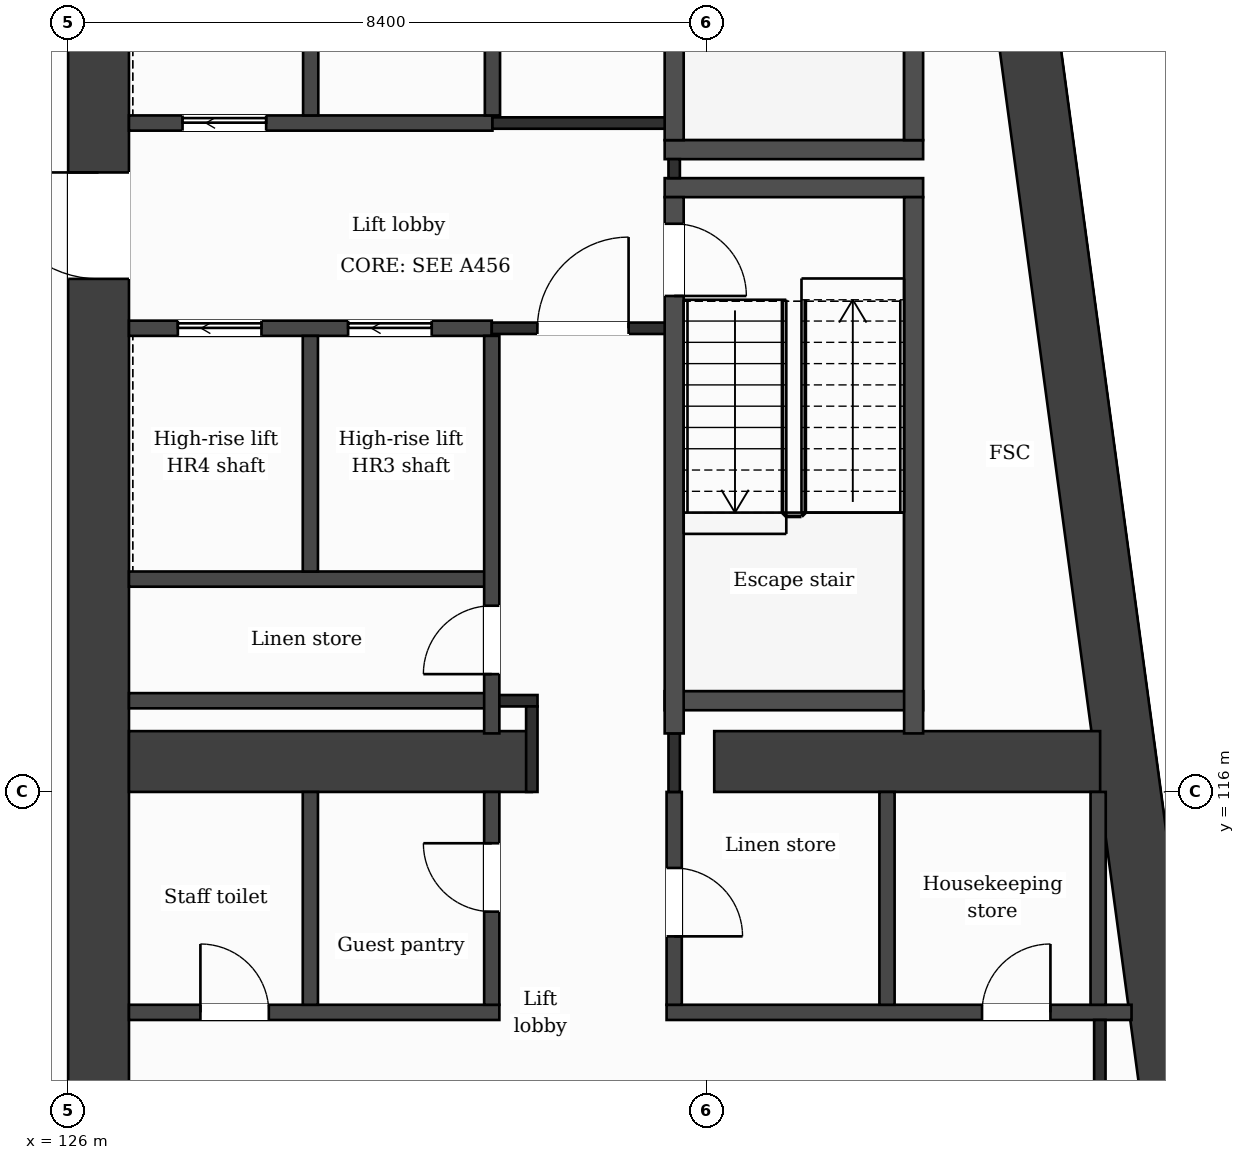
"""IFC4 building model, lengths in metres.
Left out: names, types, materials, properties, quantities, classifications, styles, units other than length and angle.
Written with IfcOpenShell. Run it as: python <this file> out.ifc"""

import sys

from ifc_helpers import new_model, si_unit, direction, frame, frame_2d, origin, place, context, subcontext, project, spatial, rectangle, extrude, element, fill, save


model = new_model("IFC4")
c1 = context("Model", 3, precision=1e-05, world=origin(), true_north=direction((0.0, 1.0)))
c2 = subcontext(c1, "Body", "Model", "MODEL_VIEW")
j1 = project(units=[si_unit("LENGTHUNIT", "METRE"), si_unit("PLANEANGLEUNIT", "RADIAN")], contexts=[c1])
p1 = place(None, origin())
s1 = spatial("IfcSite", under=j1, at=p1, CompositionType="ELEMENT")
p2 = place(p1, origin())
s2 = spatial("IfcBuilding", under=s1, at=p2, CompositionType="ELEMENT")
p3 = place(p2, frame((0.0, 0.0, 228.1)))
s3 = spatial("IfcBuildingStorey", under=s2, at=p3, CompositionType="ELEMENT", Elevation=228.1)
p4 = place(p3, frame((137.82, 132.0, 0.0), z_axis=(0.0, 0.0, 1.0), x_axis=(0.133408347329, -0.991061154956, 0.0)))
e1 = element("IfcWall", 1, at=p4, inside=s3, PredefinedType="SHEAR", context=c2, shape_type="SweptSolid", body=[
    extrude(rectangle(XDim=21.391, YDim=0.8, at=frame_2d((10.696, 0.0))), origin(), (0.0, 0.0, 1.0), 3.7),
])
p5 = place(p3, frame((126.4, 110.8, 0.0), z_axis=(0.0, 0.0, 1.0), x_axis=(0.0, 1.0, 0.0)))
e2 = element("IfcWall", 2, at=p5, inside=s3, PredefinedType="SHEAR", context=c2, shape_type="SweptSolid", body=[
    extrude(rectangle(XDim=21.2, YDim=0.8, at=frame_2d((10.6, 0.0))), origin(), (0.0, 0.0, 1.0), 3.7),
])
p6 = place(p5, frame((11.95, 0.0, 0.0)))
e3 = element("IfcOpeningElement", 3, at=p6, cuts=e2, PredefinedType="OPENING", context=c2, shape_type="SweptSolid", body=[
    extrude(rectangle(XDim=1.4, YDim=2.1, at=frame_2d((0.7, 1.05))), frame((0.0, 0.41, 0.0), z_axis=(0.0, -1.0, 0.0), x_axis=(1.0, 0.0, 0.0)), (0.0, 0.0, 1.0), 0.82),
])
p7 = place(p3, frame((126.8, 116.4, 0.0), z_axis=(0.0, 0.0, 1.0), x_axis=(1.0, 0.0, 0.0)))
e4 = element("IfcWall", 4, at=p7, inside=s3, PredefinedType="SHEAR", context=c2, shape_type="SweptSolid", body=[
    extrude(rectangle(XDim=5.3, YDim=0.8, at=frame_2d((2.65, 0.0))), origin(), (0.0, 0.0, 1.0), 3.7),
])
p8 = place(p3, frame((134.5, 116.4, 0.0), z_axis=(0.0, 0.0, 1.0), x_axis=(1.0, 0.0, 0.0)))
e5 = element("IfcWall", 5, at=p8, inside=s3, PredefinedType="SHEAR", context=c2, shape_type="SweptSolid", body=[
    extrude(rectangle(XDim=5.077, YDim=0.8, at=frame_2d((2.539, 0.0))), origin(), (0.0, 0.0, 1.0), 3.7),
])
p9 = place(p3, frame((126.8, 113.1, 0.0), z_axis=(0.0, 0.0, 1.0), x_axis=(1.0, 0.0, 0.0)))
e6 = element("IfcWall", 6, at=p9, inside=s3, PredefinedType="PARTITIONING", context=c2, shape_type="SweptSolid", body=[
    extrude(rectangle(XDim=4.873, YDim=0.2, at=frame_2d((2.437, 0.0))), origin(), (0.0, 0.0, 1.0), 3.38),
])
p10 = place(p9, frame((0.94, 0.0, 0.0)))
e7 = element("IfcOpeningElement", 7, at=p10, cuts=e6, PredefinedType="OPENING", context=c2, shape_type="SweptSolid", body=[
    extrude(rectangle(XDim=0.9, YDim=2.1, at=frame_2d((0.45, 1.05))), frame((0.0, 0.11, 0.0), z_axis=(0.0, -1.0, 0.0), x_axis=(1.0, 0.0, 0.0)), (0.0, 0.0, 1.0), 0.22),
])
p11 = place(p3, frame((133.873, 113.1, 0.0), z_axis=(0.0, 0.0, 1.0), x_axis=(1.0, 0.0, 0.0)))
e8 = element("IfcWall", 8, at=p11, inside=s3, PredefinedType="PARTITIONING", context=c2, shape_type="SweptSolid", body=[
    extrude(rectangle(XDim=6.117, YDim=0.2, at=frame_2d((3.059, 0.0))), origin(), (0.0, 0.0, 1.0), 3.38),
])
p12 = place(p11, frame((4.15, 0.0, 0.0)))
e9 = element("IfcOpeningElement", 9, at=p12, cuts=e8, PredefinedType="OPENING", context=c2, shape_type="SweptSolid", body=[
    extrude(rectangle(XDim=0.9, YDim=2.1, at=frame_2d((0.45, 1.05))), frame((0.0, 0.11, 0.0), z_axis=(0.0, -1.0, 0.0), x_axis=(1.0, 0.0, 0.0)), (0.0, 0.0, 1.0), 0.22),
])
p13 = place(p3, frame((126.8, 117.2, 0.0), z_axis=(0.0, 0.0, 1.0), x_axis=(1.0, 0.0, 0.0)))
e10 = element("IfcWall", 10, at=p13, inside=s3, PredefinedType="PARTITIONING", context=c2, shape_type="SweptSolid", body=[
    extrude(rectangle(XDim=4.773, YDim=0.2, at=frame_2d((2.386, 0.0))), origin(), (0.0, 0.0, 1.0), 3.38),
])
p14 = place(p3, frame((131.573, 117.2, 0.0), z_axis=(0.0, 0.0, 1.0), x_axis=(1.0, 0.0, 0.0)))
e11 = element("IfcWall", 11, at=p14, inside=s3, PredefinedType="PARTITIONING", context=c2, shape_type="SweptSolid", body=[
    extrude(rectangle(XDim=0.602, YDim=0.15, at=frame_2d((0.301, 0.0))), origin(), (0.0, 0.0, 1.0), 3.38),
])
p15 = place(p3, frame((133.848, 117.2, 0.0), z_axis=(0.0, 0.0, 1.0), x_axis=(1.0, 0.0, 0.0)))
e12 = element("IfcWall", 12, at=p15, inside=s3, PredefinedType="PARTITIONING", context=c2, shape_type="SweptSolid", body=[
    extrude(rectangle(XDim=3.4, YDim=0.25, at=frame_2d((1.7, 0.0))), origin(), (0.0, 0.0, 1.0), 3.38),
])
p16 = place(p3, frame((126.8, 118.8, 0.0), z_axis=(0.0, 0.0, 1.0), x_axis=(1.0, 0.0, 0.0)))
e13 = element("IfcWall", 13, at=p16, inside=s3, PredefinedType="PARTITIONING", context=c2, shape_type="SweptSolid", body=[
    extrude(rectangle(XDim=4.773, YDim=0.2, at=frame_2d((2.386, 0.0))), origin(), (0.0, 0.0, 1.0), 3.38),
])
p17 = place(p3, frame((126.8, 122.1, 0.0), z_axis=(0.0, 0.0, 1.0), x_axis=(1.0, 0.0, 0.0)))
e14 = element("IfcWall", 14, at=p17, inside=s3, PredefinedType="PARTITIONING", context=c2, shape_type="SweptSolid", body=[
    extrude(rectangle(XDim=4.773, YDim=0.2, at=frame_2d((2.386, 0.0))), origin(), (0.0, 0.0, 1.0), 3.38),
])
p18 = place(p17, frame((2.883, 0.0, 0.0)))
e15 = element("IfcOpeningElement", 15, at=p18, cuts=e14, PredefinedType="OPENING", context=c2, shape_type="SweptSolid", body=[
    extrude(rectangle(XDim=1.1, YDim=2.1, at=frame_2d((0.55, 1.05))), frame((0.0, 0.11, 0.0), z_axis=(0.0, -1.0, 0.0), x_axis=(1.0, 0.0, 0.0)), (0.0, 0.0, 1.0), 0.22),
])
p19 = place(p17, frame((0.643, 0.0, 0.0)))
e16 = element("IfcOpeningElement", 16, at=p19, cuts=e14, PredefinedType="OPENING", context=c2, shape_type="SweptSolid", body=[
    extrude(rectangle(XDim=1.1, YDim=2.1, at=frame_2d((0.55, 1.05))), frame((0.0, 0.11, 0.0), z_axis=(0.0, -1.0, 0.0), x_axis=(1.0, 0.0, 0.0)), (0.0, 0.0, 1.0), 0.22),
])
p20 = place(p3, frame((131.573, 122.1, 0.0), z_axis=(0.0, 0.0, 1.0), x_axis=(1.0, 0.0, 0.0)))
e17 = element("IfcWall", 17, at=p20, inside=s3, PredefinedType="PARTITIONING", context=c2, shape_type="SweptSolid", body=[
    extrude(rectangle(XDim=2.4, YDim=0.15, at=frame_2d((1.2, 0.0))), origin(), (0.0, 0.0, 1.0), 3.38),
])
p21 = place(p20, frame((0.6, 0.0, 0.0)))
e18 = element("IfcOpeningElement", 18, at=p21, cuts=e17, PredefinedType="OPENING", context=c2, shape_type="SweptSolid", body=[
    extrude(rectangle(XDim=1.2, YDim=2.1, at=frame_2d((0.6, 1.05))), frame((0.0, 0.085, 0.0), z_axis=(0.0, -1.0, 0.0), x_axis=(1.0, 0.0, 0.0)), (0.0, 0.0, 1.0), 0.17),
])
for number, where, z_axis, x_axis in (
    (19, (133.848, 123.95, 0.0), (0.0, 0.0, 1.0), (1.0, 0.0, 0.0)),
    (20, (133.848, 124.45, 0.0), (0.0, 0.0, 1.0), (1.0, 0.0, 0.0)),
):
    element("IfcWall", number, at=place(p3, frame(where, z_axis=z_axis, x_axis=x_axis)), inside=s3, PredefinedType="PARTITIONING", context=c2, shape_type="SweptSolid", body=[
        extrude(rectangle(XDim=3.4, YDim=0.25, at=frame_2d((1.7, 0.0))), origin(), (0.0, 0.0, 1.0), 3.38),
    ])
p22 = place(p3, frame((126.8, 124.8, 0.0), z_axis=(0.0, 0.0, 1.0), x_axis=(1.0, 0.0, 0.0)))
e21 = element("IfcWall", 21, at=p22, inside=s3, PredefinedType="PARTITIONING", context=c2, shape_type="SweptSolid", body=[
    extrude(rectangle(XDim=4.782, YDim=0.2, at=frame_2d((2.391, 0.0))), origin(), (0.0, 0.0, 1.0), 3.38),
])
p23 = place(p22, frame((0.705, 0.0, 0.0)))
e22 = element("IfcOpeningElement", 22, at=p23, cuts=e21, PredefinedType="OPENING", context=c2, shape_type="SweptSolid", body=[
    extrude(rectangle(XDim=1.1, YDim=2.1, at=frame_2d((0.55, 1.05))), frame((0.0, 0.11, 0.0), z_axis=(0.0, -1.0, 0.0), x_axis=(1.0, 0.0, 0.0)), (0.0, 0.0, 1.0), 0.22),
])
p24 = place(p3, frame((131.582, 124.8, 0.0), z_axis=(0.0, 0.0, 1.0), x_axis=(1.0, 0.0, 0.0)))
e23 = element("IfcWall", 23, at=p24, inside=s3, PredefinedType="PARTITIONING", context=c2, shape_type="SweptSolid", body=[
    extrude(rectangle(XDim=2.516, YDim=0.15, at=frame_2d((1.258, 0.0))), origin(), (0.0, 0.0, 1.0), 3.38),
])
p25 = place(p3, frame((129.187, 113.2, 0.0), z_axis=(0.0, 0.0, 1.0), x_axis=(0.0, 1.0, 0.0)))
e24 = element("IfcWall", 24, at=p25, inside=s3, PredefinedType="PARTITIONING", context=c2, shape_type="SweptSolid", body=[
    extrude(rectangle(XDim=2.8, YDim=0.2, at=frame_2d((1.4, 0.0))), origin(), (0.0, 0.0, 1.0), 3.38),
])
for number, where, z_axis, x_axis in (
    (25, (129.187, 118.9, 0.0), (0.0, 0.0, 1.0), (0.0, 1.0, 0.0)),
    (26, (129.191, 124.9, 0.0), (0.0, 0.0, 1.0), (0.0, 1.0, 0.0)),
):
    element("IfcWall", number, at=place(p3, frame(where, z_axis=z_axis, x_axis=x_axis)), inside=s3, PredefinedType="PARTITIONING", context=c2, shape_type="SweptSolid", body=[
        extrude(rectangle(XDim=3.1, YDim=0.2, at=frame_2d((1.55, 0.0))), origin(), (0.0, 0.0, 1.0), 3.38),
    ])
p26 = place(p3, frame((131.573, 113.2, 0.0), z_axis=(0.0, 0.0, 1.0), x_axis=(0.0, 1.0, 0.0)))
e27 = element("IfcWall", 27, at=p26, inside=s3, PredefinedType="PARTITIONING", context=c2, shape_type="SweptSolid", body=[
    extrude(rectangle(XDim=2.8, YDim=0.2, at=frame_2d((1.4, 0.0))), origin(), (0.0, 0.0, 1.0), 3.38),
])
p27 = place(p26, frame((1.225, 0.0, 0.0)))
e28 = element("IfcOpeningElement", 28, at=p27, cuts=e27, PredefinedType="OPENING", context=c2, shape_type="SweptSolid", body=[
    extrude(rectangle(XDim=0.9, YDim=2.1, at=frame_2d((0.45, 1.05))), frame((0.0, 0.11, 0.0), z_axis=(0.0, -1.0, 0.0), x_axis=(1.0, 0.0, 0.0)), (0.0, 0.0, 1.0), 0.22),
])
p28 = place(p3, frame((131.573, 116.77, 0.0), z_axis=(0.0, 0.0, 1.0), x_axis=(0.0, 1.0, 0.0)))
e29 = element("IfcWall", 29, at=p28, inside=s3, PredefinedType="PARTITIONING", context=c2, shape_type="SweptSolid", body=[
    extrude(rectangle(XDim=5.23, YDim=0.2, at=frame_2d((2.615, 0.0))), origin(), (0.0, 0.0, 1.0), 3.38),
])
p29 = place(p28, frame((0.78, 0.0, 0.0)))
e30 = element("IfcOpeningElement", 30, at=p29, cuts=e29, PredefinedType="OPENING", context=c2, shape_type="SweptSolid", body=[
    extrude(rectangle(XDim=0.9, YDim=2.1, at=frame_2d((0.45, 1.05))), frame((0.0, 0.11, 0.0), z_axis=(0.0, -1.0, 0.0), x_axis=(1.0, 0.0, 0.0)), (0.0, 0.0, 1.0), 0.22),
])
p30 = place(p3, frame((131.582, 124.9, 0.0), z_axis=(0.0, 0.0, 1.0), x_axis=(0.0, 1.0, 0.0)))
e31 = element("IfcWall", 31, at=p30, inside=s3, PredefinedType="PARTITIONING", context=c2, shape_type="SweptSolid", body=[
    extrude(rectangle(XDim=3.1, YDim=0.2, at=frame_2d((1.55, 0.0))), origin(), (0.0, 0.0, 1.0), 3.38),
])
p31 = place(p3, frame((132.1, 116.0, 0.0), z_axis=(0.0, 0.0, 1.0), x_axis=(0.0, 1.0, 0.0)))
e32 = element("IfcWall", 32, at=p31, inside=s3, PredefinedType="PARTITIONING", context=c2, shape_type="SweptSolid", body=[
    extrude(rectangle(XDim=1.125, YDim=0.15, at=frame_2d((0.562, 0.0))), origin(), (0.0, 0.0, 1.0), 3.38),
])
p32 = place(p3, frame((133.973, 113.2, 0.0), z_axis=(0.0, 0.0, 1.0), x_axis=(0.0, 1.0, 0.0)))
e33 = element("IfcWall", 33, at=p32, inside=s3, PredefinedType="PARTITIONING", context=c2, shape_type="SweptSolid", body=[
    extrude(rectangle(XDim=2.8, YDim=0.2, at=frame_2d((1.4, 0.0))), origin(), (0.0, 0.0, 1.0), 3.38),
])
p33 = place(p32, frame((0.9, 0.0, 0.0)))
e34 = element("IfcOpeningElement", 34, at=p33, cuts=e33, PredefinedType="OPENING", context=c2, shape_type="SweptSolid", body=[
    extrude(rectangle(XDim=0.9, YDim=2.1, at=frame_2d((0.45, 1.05))), frame((0.0, 0.11, 0.0), z_axis=(0.0, -1.0, 0.0), x_axis=(1.0, 0.0, 0.0)), (0.0, 0.0, 1.0), 0.22),
])
p34 = place(p3, frame((133.973, 116.0, 0.0), z_axis=(0.0, 0.0, 1.0), x_axis=(0.0, 1.0, 0.0)))
e35 = element("IfcWall", 35, at=p34, inside=s3, PredefinedType="PARTITIONING", context=c2, shape_type="SweptSolid", body=[
    extrude(rectangle(XDim=0.77, YDim=0.15, at=frame_2d((0.385, 0.0))), origin(), (0.0, 0.0, 1.0), 3.38),
])
p35 = place(p3, frame((133.973, 124.075, 0.0), z_axis=(0.0, 0.0, 1.0), x_axis=(0.0, 1.0, 0.0)))
e36 = element("IfcWall", 36, at=p35, inside=s3, PredefinedType="PARTITIONING", context=c2, shape_type="SweptSolid", body=[
    extrude(rectangle(XDim=0.25, YDim=0.15, at=frame_2d((0.125, 0.0))), origin(), (0.0, 0.0, 1.0), 3.38),
])
p36 = place(p3, frame((133.973, 116.77, 0.0), z_axis=(0.0, 0.0, 1.0), x_axis=(0.0, 1.0, 0.0)))
e37 = element("IfcWall", 37, at=p36, inside=s3, PredefinedType="PARTITIONING", context=c2, shape_type="SweptSolid", body=[
    extrude(rectangle(XDim=7.055, YDim=0.25, at=frame_2d((3.527, 0.0))), origin(), (0.0, 0.0, 1.0), 3.38),
])
p37 = place(p36, frame((5.755, 0.0, 0.0)))
e38 = element("IfcOpeningElement", 38, at=p37, cuts=e37, PredefinedType="OPENING", context=c2, shape_type="SweptSolid", body=[
    extrude(rectangle(XDim=0.95, YDim=2.1, at=frame_2d((0.475, 1.05))), frame((0.0, 0.135, 0.0), z_axis=(0.0, -1.0, 0.0), x_axis=(1.0, 0.0, 0.0)), (0.0, 0.0, 1.0), 0.27),
])
p38 = place(p3, frame((133.973, 124.575, 0.0), z_axis=(0.0, 0.0, 1.0), x_axis=(0.0, 1.0, 0.0)))
e39 = element("IfcWall", 39, at=p38, inside=s3, PredefinedType="PARTITIONING", context=c2, shape_type="SweptSolid", body=[
    extrude(rectangle(XDim=7.055, YDim=0.25, at=frame_2d((3.527, 0.0))), origin(), (0.0, 0.0, 1.0), 3.38),
])
p39 = place(p38, frame((5.325, 0.0, 0.0)))
e40 = element("IfcOpeningElement", 40, at=p39, cuts=e39, PredefinedType="OPENING", context=c2, shape_type="SweptSolid", body=[
    extrude(rectangle(XDim=1.0, YDim=2.1, at=frame_2d((0.5, 1.05))), frame((0.0, 0.135, 0.0), z_axis=(0.0, -1.0, 0.0), x_axis=(1.0, 0.0, 0.0)), (0.0, 0.0, 1.0), 0.27),
])
p40 = place(p3, frame((136.773, 113.2, 0.0), z_axis=(0.0, 0.0, 1.0), x_axis=(0.0, 1.0, 0.0)))
e41 = element("IfcWall", 41, at=p40, inside=s3, PredefinedType="PARTITIONING", context=c2, shape_type="SweptSolid", body=[
    extrude(rectangle(XDim=2.8, YDim=0.2, at=frame_2d((1.4, 0.0))), origin(), (0.0, 0.0, 1.0), 3.38),
])
for number, where, z_axis, x_axis in (
    (42, (137.123, 116.77, 0.0), (0.0, 0.0, 1.0), (0.0, 1.0, 0.0)),
    (43, (137.123, 124.575, 0.0), (0.0, 0.0, 1.0), (0.0, 1.0, 0.0)),
):
    element("IfcWall", number, at=place(p3, frame(where, z_axis=z_axis, x_axis=x_axis)), inside=s3, PredefinedType="PARTITIONING", context=c2, shape_type="SweptSolid", body=[
        extrude(rectangle(XDim=7.055, YDim=0.25, at=frame_2d((3.527, 0.0))), origin(), (0.0, 0.0, 1.0), 3.38),
    ])
p41 = place(p3, frame((139.551, 113.2, 0.0), z_axis=(0.0, 0.0, 1.0), x_axis=(0.0, 1.0, 0.0)))
e44 = element("IfcWall", 44, at=p41, inside=s3, PredefinedType="PARTITIONING", context=c2, shape_type="SweptSolid", body=[
    extrude(rectangle(XDim=2.8, YDim=0.2, at=frame_2d((1.4, 0.0))), origin(), (0.0, 0.0, 1.0), 3.38),
])
p42 = place(p3, frame((139.573, 111.2, 0.0), z_axis=(0.0, 0.0, 1.0), x_axis=(0.0, 1.0, 0.0)))
e45 = element("IfcWall", 45, at=p42, inside=s3, PredefinedType="PARTITIONING", context=c2, shape_type="SweptSolid", body=[
    extrude(rectangle(XDim=1.8, YDim=0.15, at=frame_2d((0.9, 0.0))), origin(), (0.0, 0.0, 1.0), 3.38),
])
p43 = place(p21, origin())
e46 = element("IfcDoor", 46, at=p43, inside=s3, OperationType="SINGLE_SWING_RIGHT", PredefinedType="DOOR", context=c2, shape_type="SweptSolid", body=[
    extrude(rectangle(XDim=1.2, YDim=2.1, at=frame_2d((0.6, 1.05))), frame((0.0, 0.025, 0.0), z_axis=(0.0, -1.0, 0.0), x_axis=(1.0, 0.0, 0.0)), (0.0, 0.0, 1.0), 0.05),
])
fill(e18, e46)
p44 = place(p18, origin())
e47 = element("IfcDoor", 47, at=p44, inside=s3, OperationType="SLIDING_TO_LEFT", PredefinedType="DOOR", context=c2, shape_type="SweptSolid", body=[
    extrude(rectangle(XDim=1.1, YDim=2.1, at=frame_2d((0.55, 1.05))), frame((0.0, 0.025, 0.0), z_axis=(0.0, -1.0, 0.0), x_axis=(1.0, 0.0, 0.0)), (0.0, 0.0, 1.0), 0.05),
])
fill(e15, e47)
p45 = place(p19, origin())
e48 = element("IfcDoor", 48, at=p45, inside=s3, OperationType="SLIDING_TO_LEFT", PredefinedType="DOOR", context=c2, shape_type="SweptSolid", body=[
    extrude(rectangle(XDim=1.1, YDim=2.1, at=frame_2d((0.55, 1.05))), frame((0.0, 0.025, 0.0), z_axis=(0.0, -1.0, 0.0), x_axis=(1.0, 0.0, 0.0)), (0.0, 0.0, 1.0), 0.05),
])
fill(e16, e48)
p46 = place(p23, origin())
e49 = element("IfcDoor", 49, at=p46, inside=s3, OperationType="SLIDING_TO_LEFT", PredefinedType="DOOR", context=c2, shape_type="SweptSolid", body=[
    extrude(rectangle(XDim=1.1, YDim=2.1, at=frame_2d((0.55, 1.05))), frame((0.0, 0.025, 0.0), z_axis=(0.0, -1.0, 0.0), x_axis=(1.0, 0.0, 0.0)), (0.0, 0.0, 1.0), 0.05),
])
fill(e22, e49)
p47 = place(p37, origin())
e50 = element("IfcDoor", 50, at=p47, inside=s3, OperationType="SINGLE_SWING_LEFT", PredefinedType="DOOR", context=c2, shape_type="SweptSolid", body=[
    extrude(rectangle(XDim=0.95, YDim=2.1, at=frame_2d((0.475, 1.05))), frame((0.0, 0.025, 0.0), z_axis=(0.0, -1.0, 0.0), x_axis=(1.0, 0.0, 0.0)), (0.0, 0.0, 1.0), 0.05),
])
fill(e38, e50)
p48 = place(p29, origin())
e51 = element("IfcDoor", 51, at=p48, inside=s3, OperationType="SINGLE_SWING_LEFT", PredefinedType="DOOR", context=c2, shape_type="SweptSolid", body=[
    extrude(rectangle(XDim=0.9, YDim=2.1, at=frame_2d((0.45, 1.05))), frame((0.0, 0.025, 0.0), z_axis=(0.0, -1.0, 0.0), x_axis=(1.0, 0.0, 0.0)), (0.0, 0.0, 1.0), 0.05),
])
fill(e30, e51)
p49 = place(p12, origin())
e52 = element("IfcDoor", 52, at=p49, inside=s3, OperationType="SINGLE_SWING_RIGHT", PredefinedType="DOOR", context=c2, shape_type="SweptSolid", body=[
    extrude(rectangle(XDim=0.9, YDim=2.1, at=frame_2d((0.45, 1.05))), frame((0.0, 0.025, 0.0), z_axis=(0.0, -1.0, 0.0), x_axis=(1.0, 0.0, 0.0)), (0.0, 0.0, 1.0), 0.05),
])
fill(e9, e52)
p50 = place(p33, origin())
e53 = element("IfcDoor", 53, at=p50, inside=s3, OperationType="SINGLE_SWING_LEFT", PredefinedType="DOOR", context=c2, shape_type="SweptSolid", body=[
    extrude(rectangle(XDim=0.9, YDim=2.1, at=frame_2d((0.45, 1.05))), frame((0.0, 0.025, 0.0), z_axis=(0.0, -1.0, 0.0), x_axis=(1.0, 0.0, 0.0)), (0.0, 0.0, 1.0), 0.05),
])
fill(e34, e53)
p51 = place(p27, origin())
e54 = element("IfcDoor", 54, at=p51, inside=s3, OperationType="SINGLE_SWING_RIGHT", PredefinedType="DOOR", context=c2, shape_type="SweptSolid", body=[
    extrude(rectangle(XDim=0.9, YDim=2.1, at=frame_2d((0.45, 1.05))), frame((0.0, 0.025, 0.0), z_axis=(0.0, -1.0, 0.0), x_axis=(1.0, 0.0, 0.0)), (0.0, 0.0, 1.0), 0.05),
])
fill(e28, e54)
p52 = place(p10, origin())
e55 = element("IfcDoor", 55, at=p52, inside=s3, OperationType="SINGLE_SWING_LEFT", PredefinedType="DOOR", context=c2, shape_type="SweptSolid", body=[
    extrude(rectangle(XDim=0.9, YDim=2.1, at=frame_2d((0.45, 1.05))), frame((0.0, 0.025, 0.0), z_axis=(0.0, -1.0, 0.0), x_axis=(1.0, 0.0, 0.0)), (0.0, 0.0, 1.0), 0.05),
])
fill(e7, e55)
p53 = place(p6, origin())
e56 = element("IfcDoor", 56, at=p53, inside=s3, OperationType="SINGLE_SWING_RIGHT", PredefinedType="DOOR", context=c2, shape_type="SweptSolid", body=[
    extrude(rectangle(XDim=1.4, YDim=2.1, at=frame_2d((0.7, 1.05))), frame((0.0, 0.025, 0.0), z_axis=(0.0, -1.0, 0.0), x_axis=(1.0, 0.0, 0.0)), (0.0, 0.0, 1.0), 0.05),
])
fill(e3, e56)
save(model, sys.argv[1])
